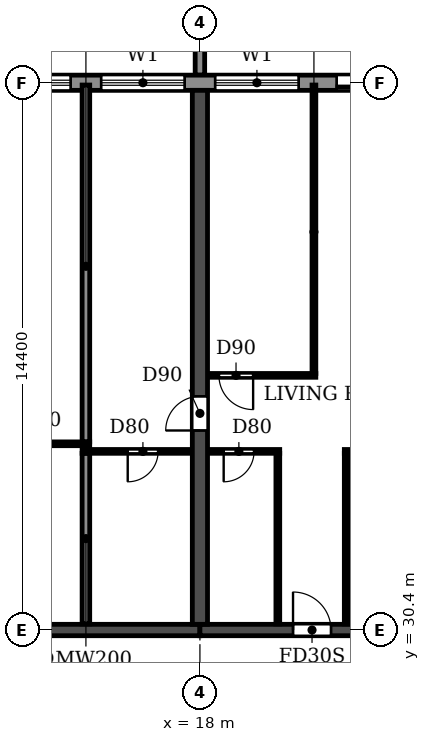
"""IFC4 building model, lengths in metres.
Left out: names, types, materials, properties, quantities, classifications, styles, units other than length and angle.
Written with IfcOpenShell. Run it as: python <this file> out.ifc"""

import sys

from ifc_helpers import new_model, si_unit, direction, frame, frame_2d, origin, place, context, subcontext, project, spatial, polyline, rectangle, outline, extrude, source, transform, mapped, element, fill, save


model = new_model("IFC4")
c1 = context("Model", 3, precision=1e-05, world=origin(), true_north=direction((0.0, 1.0)))
c2 = subcontext(c1, "Body", "Model", "MODEL_VIEW")
j1 = project(units=[si_unit("LENGTHUNIT", "METRE"), si_unit("PLANEANGLEUNIT", "RADIAN")], contexts=[c1])
p1 = place(None, origin())
s1 = spatial("IfcSite", under=j1, at=p1, CompositionType="ELEMENT")
p2 = place(p1, origin())
s2 = spatial("IfcBuilding", under=s1, at=p2, CompositionType="ELEMENT")
p3 = place(p2, frame((0.0, 0.0, 49.8)))
s3 = spatial("IfcBuildingStorey", under=s2, at=p3, CompositionType="ELEMENT", Elevation=49.8)
p4 = place(p3, frame((18.0, 30.55, 0.0), z_axis=(0.0, 0.0, 1.0), x_axis=(0.0, 1.0, 0.0)))
e1 = element("IfcWall", 1, at=p4, inside=s3, PredefinedType="SHEAR", context=c2, shape_type="SweptSolid", body=[
    extrude(rectangle(XDim=14.05, YDim=0.4, at=frame_2d((7.025, 0.0))), origin(), (0.0, 0.0, 1.0), 3.0),
])
p5 = place(p4, frame((5.1, 0.0, 0.0)))
e2 = element("IfcOpeningElement", 2, at=p5, cuts=e1, PredefinedType="OPENING", context=c2, shape_type="SweptSolid", body=[
    extrude(rectangle(XDim=0.9, YDim=2.1, at=frame_2d((0.45, 1.05))), frame((0.0, 0.21, 0.0), z_axis=(0.0, -1.0, 0.0), x_axis=(1.0, 0.0, 0.0)), (0.0, 0.0, 1.0), 0.42),
])
p6 = place(p3, frame((12.0, 30.4, 0.0), z_axis=(0.0, 0.0, 1.0), x_axis=(1.0, 0.0, 0.0)))
e3 = element("IfcWall", 3, at=p6, inside=s3, PredefinedType="SHEAR", context=c2, shape_type="SweptSolid", body=[
    extrude(rectangle(XDim=6.0, YDim=0.3, at=frame_2d((3.0, 0.0))), origin(), (0.0, 0.0, 1.0), 2.4),
])
p7 = place(p3, frame((18.0, 30.4, 0.0), z_axis=(0.0, 0.0, 1.0), x_axis=(1.0, 0.0, 0.0)))
e4 = element("IfcWall", 4, at=p7, inside=s3, PredefinedType="SHEAR", context=c2, shape_type="SweptSolid", body=[
    extrude(rectangle(XDim=6.0, YDim=0.3, at=frame_2d((3.0, 0.0))), origin(), (0.0, 0.0, 1.0), 2.4),
])
p8 = place(p7, frame((2.45, 0.0, 0.0)))
e5 = element("IfcOpeningElement", 5, at=p8, cuts=e4, PredefinedType="OPENING", context=c2, shape_type="SweptSolid", body=[
    extrude(rectangle(XDim=1.0, YDim=2.1, at=frame_2d((0.5, 1.05))), frame((0.0, 0.16, 0.0), z_axis=(0.0, -1.0, 0.0), x_axis=(1.0, 0.0, 0.0)), (0.0, 0.0, 1.0), 0.32),
])
p9 = place(p3, frame((97.317, 44.8, 0.0), z_axis=(0.0, 0.0, 1.0), x_axis=(-1.0, 0.0, 0.0)))
e6 = element("IfcWall", 6, at=p9, inside=s3, PredefinedType="STANDARD", context=c2, shape_type="SweptSolid", body=[
    extrude(rectangle(XDim=92.634, YDim=0.4, at=frame_2d((46.317, 0.0))), origin(), (0.0, 0.0, 1.0), 3.0),
])
p10 = place(p9, frame((88.917, 0.0, 0.0)))
e7 = element("IfcOpeningElement", 7, at=p10, cuts=e6, PredefinedType="OPENING", context=c2, shape_type="SweptSolid", body=[
    extrude(rectangle(XDim=1.8, YDim=2.4, at=frame_2d((0.9, 1.2))), frame((0.0, 0.21, 0.0), z_axis=(0.0, -1.0, 0.0), x_axis=(1.0, 0.0, 0.0)), (0.0, 0.0, 1.0), 0.42),
])
p11 = place(p9, frame((85.717, 0.0, 0.9)))
e8 = element("IfcOpeningElement", 8, at=p11, cuts=e6, PredefinedType="OPENING", context=c2, shape_type="SweptSolid", body=[
    extrude(rectangle(XDim=2.2, YDim=1.5, at=frame_2d((1.1, 0.75))), frame((0.0, 0.21, 0.0), z_axis=(0.0, -1.0, 0.0), x_axis=(1.0, 0.0, 0.0)), (0.0, 0.0, 1.0), 0.42),
])
p12 = place(p9, frame((82.717, 0.0, 0.9)))
e9 = element("IfcOpeningElement", 9, at=p12, cuts=e6, PredefinedType="OPENING", context=c2, shape_type="SweptSolid", body=[
    extrude(rectangle(XDim=2.2, YDim=1.5, at=frame_2d((1.1, 0.75))), frame((0.0, 0.21, 0.0), z_axis=(0.0, -1.0, 0.0), x_axis=(1.0, 0.0, 0.0)), (0.0, 0.0, 1.0), 0.42),
])
p13 = place(p9, frame((79.717, 0.0, 0.9)))
e10 = element("IfcOpeningElement", 10, at=p13, cuts=e6, PredefinedType="OPENING", context=c2, shape_type="SweptSolid", body=[
    extrude(rectangle(XDim=2.2, YDim=1.5, at=frame_2d((1.1, 0.75))), frame((0.0, 0.21, 0.0), z_axis=(0.0, -1.0, 0.0), x_axis=(1.0, 0.0, 0.0)), (0.0, 0.0, 1.0), 0.42),
])
p14 = place(p9, frame((76.717, 0.0, 0.9)))
e11 = element("IfcOpeningElement", 11, at=p14, cuts=e6, PredefinedType="OPENING", context=c2, shape_type="SweptSolid", body=[
    extrude(rectangle(XDim=2.2, YDim=1.5, at=frame_2d((1.1, 0.75))), frame((0.0, 0.21, 0.0), z_axis=(0.0, -1.0, 0.0), x_axis=(1.0, 0.0, 0.0)), (0.0, 0.0, 1.0), 0.42),
])
p15 = place(p9, frame((73.917, 0.0, 0.0)))
e12 = element("IfcOpeningElement", 12, at=p15, cuts=e6, PredefinedType="OPENING", context=c2, shape_type="SweptSolid", body=[
    extrude(rectangle(XDim=1.8, YDim=2.4, at=frame_2d((0.9, 1.2))), frame((0.0, 0.21, 0.0), z_axis=(0.0, -1.0, 0.0), x_axis=(1.0, 0.0, 0.0)), (0.0, 0.0, 1.0), 0.42),
])
p16 = place(p9, frame((70.717, 0.0, 0.9)))
e13 = element("IfcOpeningElement", 13, at=p16, cuts=e6, PredefinedType="OPENING", context=c2, shape_type="SweptSolid", body=[
    extrude(rectangle(XDim=2.2, YDim=1.5, at=frame_2d((1.1, 0.75))), frame((0.0, 0.21, 0.0), z_axis=(0.0, -1.0, 0.0), x_axis=(1.0, 0.0, 0.0)), (0.0, 0.0, 1.0), 0.42),
])
p17 = place(p9, frame((67.717, 0.0, 0.9)))
e14 = element("IfcOpeningElement", 14, at=p17, cuts=e6, PredefinedType="OPENING", context=c2, shape_type="SweptSolid", body=[
    extrude(rectangle(XDim=2.2, YDim=1.5, at=frame_2d((1.1, 0.75))), frame((0.0, 0.21, 0.0), z_axis=(0.0, -1.0, 0.0), x_axis=(1.0, 0.0, 0.0)), (0.0, 0.0, 1.0), 0.42),
])
p18 = place(p9, frame((64.717, 0.0, 0.9)))
e15 = element("IfcOpeningElement", 15, at=p18, cuts=e6, PredefinedType="OPENING", context=c2, shape_type="SweptSolid", body=[
    extrude(rectangle(XDim=2.2, YDim=1.5, at=frame_2d((1.1, 0.75))), frame((0.0, 0.21, 0.0), z_axis=(0.0, -1.0, 0.0), x_axis=(1.0, 0.0, 0.0)), (0.0, 0.0, 1.0), 0.42),
])
p19 = place(p9, frame((61.917, 0.0, 0.0)))
e16 = element("IfcOpeningElement", 16, at=p19, cuts=e6, PredefinedType="OPENING", context=c2, shape_type="SweptSolid", body=[
    extrude(rectangle(XDim=1.8, YDim=2.4, at=frame_2d((0.9, 1.2))), frame((0.0, 0.21, 0.0), z_axis=(0.0, -1.0, 0.0), x_axis=(1.0, 0.0, 0.0)), (0.0, 0.0, 1.0), 0.42),
])
p20 = place(p9, frame((58.717, 0.0, 0.9)))
e17 = element("IfcOpeningElement", 17, at=p20, cuts=e6, PredefinedType="OPENING", context=c2, shape_type="SweptSolid", body=[
    extrude(rectangle(XDim=2.2, YDim=1.5, at=frame_2d((1.1, 0.75))), frame((0.0, 0.21, 0.0), z_axis=(0.0, -1.0, 0.0), x_axis=(1.0, 0.0, 0.0)), (0.0, 0.0, 1.0), 0.42),
])
p21 = place(p9, frame((55.717, 0.0, 0.9)))
e18 = element("IfcOpeningElement", 18, at=p21, cuts=e6, PredefinedType="OPENING", context=c2, shape_type="SweptSolid", body=[
    extrude(rectangle(XDim=2.2, YDim=1.5, at=frame_2d((1.1, 0.75))), frame((0.0, 0.21, 0.0), z_axis=(0.0, -1.0, 0.0), x_axis=(1.0, 0.0, 0.0)), (0.0, 0.0, 1.0), 0.42),
])
p22 = place(p9, frame((52.717, 0.0, 0.9)))
e19 = element("IfcOpeningElement", 19, at=p22, cuts=e6, PredefinedType="OPENING", context=c2, shape_type="SweptSolid", body=[
    extrude(rectangle(XDim=2.2, YDim=1.5, at=frame_2d((1.1, 0.75))), frame((0.0, 0.21, 0.0), z_axis=(0.0, -1.0, 0.0), x_axis=(1.0, 0.0, 0.0)), (0.0, 0.0, 1.0), 0.42),
])
p23 = place(p9, frame((49.917, 0.0, 0.0)))
e20 = element("IfcOpeningElement", 20, at=p23, cuts=e6, PredefinedType="OPENING", context=c2, shape_type="SweptSolid", body=[
    extrude(rectangle(XDim=1.8, YDim=2.4, at=frame_2d((0.9, 1.2))), frame((0.0, 0.21, 0.0), z_axis=(0.0, -1.0, 0.0), x_axis=(1.0, 0.0, 0.0)), (0.0, 0.0, 1.0), 0.42),
])
p24 = place(p9, frame((46.717, 0.0, 0.9)))
e21 = element("IfcOpeningElement", 21, at=p24, cuts=e6, PredefinedType="OPENING", context=c2, shape_type="SweptSolid", body=[
    extrude(rectangle(XDim=2.2, YDim=1.5, at=frame_2d((1.1, 0.75))), frame((0.0, 0.21, 0.0), z_axis=(0.0, -1.0, 0.0), x_axis=(1.0, 0.0, 0.0)), (0.0, 0.0, 1.0), 0.42),
])
p25 = place(p9, frame((43.717, 0.0, 0.9)))
e22 = element("IfcOpeningElement", 22, at=p25, cuts=e6, PredefinedType="OPENING", context=c2, shape_type="SweptSolid", body=[
    extrude(rectangle(XDim=2.2, YDim=1.5, at=frame_2d((1.1, 0.75))), frame((0.0, 0.21, 0.0), z_axis=(0.0, -1.0, 0.0), x_axis=(1.0, 0.0, 0.0)), (0.0, 0.0, 1.0), 0.42),
])
p26 = place(p9, frame((40.717, 0.0, 0.9)))
e23 = element("IfcOpeningElement", 23, at=p26, cuts=e6, PredefinedType="OPENING", context=c2, shape_type="SweptSolid", body=[
    extrude(rectangle(XDim=2.2, YDim=1.5, at=frame_2d((1.1, 0.75))), frame((0.0, 0.21, 0.0), z_axis=(0.0, -1.0, 0.0), x_axis=(1.0, 0.0, 0.0)), (0.0, 0.0, 1.0), 0.42),
])
p27 = place(p9, frame((37.917, 0.0, 0.0)))
e24 = element("IfcOpeningElement", 24, at=p27, cuts=e6, PredefinedType="OPENING", context=c2, shape_type="SweptSolid", body=[
    extrude(rectangle(XDim=1.8, YDim=2.4, at=frame_2d((0.9, 1.2))), frame((0.0, 0.21, 0.0), z_axis=(0.0, -1.0, 0.0), x_axis=(1.0, 0.0, 0.0)), (0.0, 0.0, 1.0), 0.42),
])
p28 = place(p9, frame((34.717, 0.0, 0.9)))
e25 = element("IfcOpeningElement", 25, at=p28, cuts=e6, PredefinedType="OPENING", context=c2, shape_type="SweptSolid", body=[
    extrude(rectangle(XDim=2.2, YDim=1.5, at=frame_2d((1.1, 0.75))), frame((0.0, 0.21, 0.0), z_axis=(0.0, -1.0, 0.0), x_axis=(1.0, 0.0, 0.0)), (0.0, 0.0, 1.0), 0.42),
])
p29 = place(p9, frame((31.717, 0.0, 0.9)))
e26 = element("IfcOpeningElement", 26, at=p29, cuts=e6, PredefinedType="OPENING", context=c2, shape_type="SweptSolid", body=[
    extrude(rectangle(XDim=2.2, YDim=1.5, at=frame_2d((1.1, 0.75))), frame((0.0, 0.21, 0.0), z_axis=(0.0, -1.0, 0.0), x_axis=(1.0, 0.0, 0.0)), (0.0, 0.0, 1.0), 0.42),
])
p30 = place(p9, frame((28.717, 0.0, 0.9)))
e27 = element("IfcOpeningElement", 27, at=p30, cuts=e6, PredefinedType="OPENING", context=c2, shape_type="SweptSolid", body=[
    extrude(rectangle(XDim=2.2, YDim=1.5, at=frame_2d((1.1, 0.75))), frame((0.0, 0.21, 0.0), z_axis=(0.0, -1.0, 0.0), x_axis=(1.0, 0.0, 0.0)), (0.0, 0.0, 1.0), 0.42),
])
p31 = place(p9, frame((25.917, 0.0, 0.0)))
e28 = element("IfcOpeningElement", 28, at=p31, cuts=e6, PredefinedType="OPENING", context=c2, shape_type="SweptSolid", body=[
    extrude(rectangle(XDim=1.8, YDim=2.4, at=frame_2d((0.9, 1.2))), frame((0.0, 0.21, 0.0), z_axis=(0.0, -1.0, 0.0), x_axis=(1.0, 0.0, 0.0)), (0.0, 0.0, 1.0), 0.42),
])
p32 = place(p9, frame((22.917, 0.0, 0.0)))
e29 = element("IfcOpeningElement", 29, at=p32, cuts=e6, PredefinedType="OPENING", context=c2, shape_type="SweptSolid", body=[
    extrude(rectangle(XDim=1.8, YDim=2.4, at=frame_2d((0.9, 1.2))), frame((0.0, 0.21, 0.0), z_axis=(0.0, -1.0, 0.0), x_axis=(1.0, 0.0, 0.0)), (0.0, 0.0, 1.0), 0.42),
])
p33 = place(p9, frame((19.717, 0.0, 0.9)))
e30 = element("IfcOpeningElement", 30, at=p33, cuts=e6, PredefinedType="OPENING", context=c2, shape_type="SweptSolid", body=[
    extrude(rectangle(XDim=2.2, YDim=1.5, at=frame_2d((1.1, 0.75))), frame((0.0, 0.21, 0.0), z_axis=(0.0, -1.0, 0.0), x_axis=(1.0, 0.0, 0.0)), (0.0, 0.0, 1.0), 0.42),
])
p34 = place(p9, frame((16.717, 0.0, 0.9)))
e31 = element("IfcOpeningElement", 31, at=p34, cuts=e6, PredefinedType="OPENING", context=c2, shape_type="SweptSolid", body=[
    extrude(rectangle(XDim=2.2, YDim=1.5, at=frame_2d((1.1, 0.75))), frame((0.0, 0.21, 0.0), z_axis=(0.0, -1.0, 0.0), x_axis=(1.0, 0.0, 0.0)), (0.0, 0.0, 1.0), 0.42),
])
p35 = place(p9, frame((13.717, 0.0, 0.9)))
e32 = element("IfcOpeningElement", 32, at=p35, cuts=e6, PredefinedType="OPENING", context=c2, shape_type="SweptSolid", body=[
    extrude(rectangle(XDim=2.2, YDim=1.5, at=frame_2d((1.1, 0.75))), frame((0.0, 0.21, 0.0), z_axis=(0.0, -1.0, 0.0), x_axis=(1.0, 0.0, 0.0)), (0.0, 0.0, 1.0), 0.42),
])
p36 = place(p9, frame((10.717, 0.0, 0.9)))
e33 = element("IfcOpeningElement", 33, at=p36, cuts=e6, PredefinedType="OPENING", context=c2, shape_type="SweptSolid", body=[
    extrude(rectangle(XDim=2.2, YDim=1.5, at=frame_2d((1.1, 0.75))), frame((0.0, 0.21, 0.0), z_axis=(0.0, -1.0, 0.0), x_axis=(1.0, 0.0, 0.0)), (0.0, 0.0, 1.0), 0.42),
])
p37 = place(p9, frame((7.917, 0.0, 0.0)))
e34 = element("IfcOpeningElement", 34, at=p37, cuts=e6, PredefinedType="OPENING", context=c2, shape_type="SweptSolid", body=[
    extrude(rectangle(XDim=1.8, YDim=2.4, at=frame_2d((0.9, 1.2))), frame((0.0, 0.21, 0.0), z_axis=(0.0, -1.0, 0.0), x_axis=(1.0, 0.0, 0.0)), (0.0, 0.0, 1.0), 0.42),
])
p38 = place(p9, frame((4.717, 0.0, 0.9)))
e35 = element("IfcOpeningElement", 35, at=p38, cuts=e6, PredefinedType="OPENING", context=c2, shape_type="SweptSolid", body=[
    extrude(rectangle(XDim=2.2, YDim=1.5, at=frame_2d((1.1, 0.75))), frame((0.0, 0.21, 0.0), z_axis=(0.0, -1.0, 0.0), x_axis=(1.0, 0.0, 0.0)), (0.0, 0.0, 1.0), 0.42),
])
p39 = place(p9, frame((1.917, 0.0, 0.0)))
e36 = element("IfcOpeningElement", 36, at=p39, cuts=e6, PredefinedType="OPENING", context=c2, shape_type="SweptSolid", body=[
    extrude(rectangle(XDim=1.8, YDim=2.4, at=frame_2d((0.9, 1.2))), frame((0.0, 0.21, 0.0), z_axis=(0.0, -1.0, 0.0), x_axis=(1.0, 0.0, 0.0)), (0.0, 0.0, 1.0), 0.42),
])
m1 = source(origin(), c2, "Body", "SweptSolid", [
    extrude(outline(polyline([(0.0, 0.0), (0.25, 0.0), (0.25, 3.1), (0.0, 3.1), (0.0, 0.0)])), origin(), (0.0, 0.0, 1.0), 3.1),
])
p40 = place(p3, frame((17.875, 45.0, 0.0)))
e37 = element("IfcWall", 37, at=p40, inside=s3, PredefinedType="STANDARD", context=c2, shape_type="MappedRepresentation", body=[
    mapped(m1, transform((0.0, 0.0, 0.0))),
])
p41 = place(p3, frame((15.0, 30.56, 0.0), z_axis=(0.0, 0.0, 1.0), x_axis=(0.0, 1.0, 0.0)))
e38 = element("IfcWall", 38, at=p41, inside=s3, PredefinedType="PARTITIONING", context=c2, shape_type="SweptSolid", body=[
    extrude(rectangle(XDim=4.49, YDim=0.2, at=frame_2d((2.245, 0.0))), origin(), (0.0, 0.0, 1.0), 3.0),
])
p42 = place(p3, frame((15.0, 35.35, 0.0), z_axis=(0.0, 0.0, 1.0), x_axis=(0.0, 1.0, 0.0)))
e39 = element("IfcWall", 39, at=p42, inside=s3, PredefinedType="PARTITIONING", context=c2, shape_type="SweptSolid", body=[
    extrude(rectangle(XDim=9.39, YDim=0.2, at=frame_2d((4.695, 0.0))), origin(), (0.0, 0.0, 1.0), 3.0),
])
p43 = place(p3, frame((14.9, 35.1, 0.0), z_axis=(0.0, 0.0, 1.0), x_axis=(1.0, 0.0, 0.0)))
e40 = element("IfcWall", 40, at=p43, inside=s3, PredefinedType="PARTITIONING", context=c2, shape_type="SweptSolid", body=[
    extrude(rectangle(XDim=2.89, YDim=0.1, at=frame_2d((1.445, 0.0))), origin(), (0.0, 0.0, 1.0), 3.0),
])
p44 = place(p43, frame((1.2, 0.0, 0.0)))
e41 = element("IfcOpeningElement", 41, at=p44, cuts=e40, PredefinedType="OPENING", context=c2, shape_type="SweptSolid", body=[
    extrude(rectangle(XDim=0.8, YDim=2.1, at=frame_2d((0.4, 1.05))), frame((0.0, 0.06, 0.0), z_axis=(0.0, -1.0, 0.0), x_axis=(1.0, 0.0, 0.0)), (0.0, 0.0, 1.0), 0.12),
])
p45 = place(p3, frame((18.21, 35.1, 0.0), z_axis=(0.0, 0.0, 1.0), x_axis=(1.0, 0.0, 0.0)))
e42 = element("IfcWall", 42, at=p45, inside=s3, PredefinedType="PARTITIONING", context=c2, shape_type="SweptSolid", body=[
    extrude(rectangle(XDim=1.89, YDim=0.1, at=frame_2d((0.945, 0.0))), origin(), (0.0, 0.0, 1.0), 3.0),
])
p46 = place(p45, frame((0.415, 0.0, 0.0)))
e43 = element("IfcOpeningElement", 43, at=p46, cuts=e42, PredefinedType="OPENING", context=c2, shape_type="SweptSolid", body=[
    extrude(rectangle(XDim=0.8, YDim=2.1, at=frame_2d((0.4, 1.05))), frame((0.0, 0.06, 0.0), z_axis=(0.0, -1.0, 0.0), x_axis=(1.0, 0.0, 0.0)), (0.0, 0.0, 1.0), 0.12),
])
p47 = place(p3, frame((21.8, 35.1, 0.0), z_axis=(0.0, 0.0, 1.0), x_axis=(1.0, 0.0, 0.0)))
e44 = element("IfcWall", 44, at=p47, inside=s3, PredefinedType="PARTITIONING", context=c2, shape_type="SweptSolid", body=[
    extrude(rectangle(XDim=1.99, YDim=0.1, at=frame_2d((0.995, 0.0))), origin(), (0.0, 0.0, 1.0), 3.0),
])
p48 = place(p47, frame((0.675, 0.0, 0.0)))
e45 = element("IfcOpeningElement", 45, at=p48, cuts=e44, PredefinedType="OPENING", context=c2, shape_type="SweptSolid", body=[
    extrude(rectangle(XDim=0.9, YDim=2.1, at=frame_2d((0.45, 1.05))), frame((0.0, 0.06, 0.0), z_axis=(0.0, -1.0, 0.0), x_axis=(1.0, 0.0, 0.0)), (0.0, 0.0, 1.0), 0.12),
])
p49 = place(p3, frame((12.21, 35.3, 0.0), z_axis=(0.0, 0.0, 1.0), x_axis=(1.0, 0.0, 0.0)))
e46 = element("IfcWall", 46, at=p49, inside=s3, PredefinedType="PARTITIONING", context=c2, shape_type="SweptSolid", body=[
    extrude(rectangle(XDim=2.89, YDim=0.1, at=frame_2d((1.445, 0.0))), origin(), (0.0, 0.0, 1.0), 3.0),
])
p50 = place(p49, frame((0.89, 0.0, 0.0)))
e47 = element("IfcOpeningElement", 47, at=p50, cuts=e46, PredefinedType="OPENING", context=c2, shape_type="SweptSolid", body=[
    extrude(rectangle(XDim=0.8, YDim=2.1, at=frame_2d((0.4, 1.05))), frame((0.0, 0.06, 0.0), z_axis=(0.0, -1.0, 0.0), x_axis=(1.0, 0.0, 0.0)), (0.0, 0.0, 1.0), 0.12),
])
p51 = place(p3, frame((18.21, 37.1, 0.0), z_axis=(0.0, 0.0, 1.0), x_axis=(1.0, 0.0, 0.0)))
e48 = element("IfcWall", 48, at=p51, inside=s3, PredefinedType="PARTITIONING", context=c2, shape_type="SweptSolid", body=[
    extrude(rectangle(XDim=2.84, YDim=0.1, at=frame_2d((1.42, 0.0))), origin(), (0.0, 0.0, 1.0), 3.0),
])
p52 = place(p51, frame((0.29, 0.0, 0.0)))
e49 = element("IfcOpeningElement", 49, at=p52, cuts=e48, PredefinedType="OPENING", context=c2, shape_type="SweptSolid", body=[
    extrude(rectangle(XDim=0.9, YDim=2.1, at=frame_2d((0.45, 1.05))), frame((0.0, 0.06, 0.0), z_axis=(0.0, -1.0, 0.0), x_axis=(1.0, 0.0, 0.0)), (0.0, 0.0, 1.0), 0.12),
])
p53 = place(p3, frame((20.05, 30.56, 0.0), z_axis=(0.0, 0.0, 1.0), x_axis=(0.0, 1.0, 0.0)))
e50 = element("IfcWall", 50, at=p53, inside=s3, PredefinedType="PARTITIONING", context=c2, shape_type="SweptSolid", body=[
    extrude(rectangle(XDim=4.49, YDim=0.1, at=frame_2d((2.245, 0.0))), origin(), (0.0, 0.0, 1.0), 3.0),
])
p54 = place(p3, frame((21.0, 37.15, 0.0), z_axis=(0.0, 0.0, 1.0), x_axis=(0.0, 1.0, 0.0)))
e51 = element("IfcWall", 51, at=p54, inside=s3, PredefinedType="PARTITIONING", context=c2, shape_type="SweptSolid", body=[
    extrude(rectangle(XDim=7.59, YDim=0.1, at=frame_2d((3.795, 0.0))), origin(), (0.0, 0.0, 1.0), 3.0),
])
p55 = place(p3, frame((21.85, 30.56, 0.0), z_axis=(0.0, 0.0, 1.0), x_axis=(0.0, 1.0, 0.0)))
e52 = element("IfcWall", 52, at=p55, inside=s3, PredefinedType="PARTITIONING", context=c2, shape_type="SweptSolid", body=[
    extrude(rectangle(XDim=4.49, YDim=0.1, at=frame_2d((2.245, 0.0))), origin(), (0.0, 0.0, 1.0), 3.0),
])
p56 = place(p12, origin())
e53 = element("IfcWindow", 53, at=p56, inside=s3, PartitioningType="DOUBLE_PANEL_HORIZONTAL", PredefinedType="WINDOW", context=c2, shape_type="SweptSolid", body=[
    extrude(rectangle(XDim=2.2, YDim=1.5, at=frame_2d((1.1, 0.75))), frame((0.0, 0.03, 0.0), z_axis=(0.0, -1.0, 0.0), x_axis=(1.0, 0.0, 0.0)), (0.0, 0.0, 1.0), 0.06),
])
fill(e9, e53)
p57 = place(p13, origin())
e54 = element("IfcWindow", 54, at=p57, inside=s3, PartitioningType="DOUBLE_PANEL_HORIZONTAL", PredefinedType="WINDOW", context=c2, shape_type="SweptSolid", body=[
    extrude(rectangle(XDim=2.2, YDim=1.5, at=frame_2d((1.1, 0.75))), frame((0.0, 0.03, 0.0), z_axis=(0.0, -1.0, 0.0), x_axis=(1.0, 0.0, 0.0)), (0.0, 0.0, 1.0), 0.06),
])
fill(e10, e54)
p58 = place(p14, origin())
e55 = element("IfcWindow", 55, at=p58, inside=s3, PartitioningType="DOUBLE_PANEL_HORIZONTAL", PredefinedType="WINDOW", context=c2, shape_type="SweptSolid", body=[
    extrude(rectangle(XDim=2.2, YDim=1.5, at=frame_2d((1.1, 0.75))), frame((0.0, 0.03, 0.0), z_axis=(0.0, -1.0, 0.0), x_axis=(1.0, 0.0, 0.0)), (0.0, 0.0, 1.0), 0.06),
])
fill(e11, e55)
p59 = place(p15, origin())
e56 = element("IfcDoor", 56, at=p59, inside=s3, OperationType="DOUBLE_DOOR_SLIDING", PredefinedType="DOOR", context=c2, shape_type="SweptSolid", body=[
    extrude(rectangle(XDim=1.8, YDim=2.4, at=frame_2d((0.9, 1.2))), frame((0.0, 0.025, 0.0), z_axis=(0.0, -1.0, 0.0), x_axis=(1.0, 0.0, 0.0)), (0.0, 0.0, 1.0), 0.05),
])
fill(e12, e56)
p60 = place(p44, frame((0.8, 0.0, 0.0), z_axis=(0.0, 0.0, 1.0), x_axis=(-1.0, 0.0, 0.0)))
e57 = element("IfcDoor", 57, at=p60, inside=s3, OperationType="SINGLE_SWING_RIGHT", PredefinedType="DOOR", context=c2, shape_type="SweptSolid", body=[
    extrude(rectangle(XDim=0.8, YDim=2.1, at=frame_2d((0.4, 1.05))), frame((0.0, 0.025, 0.0), z_axis=(0.0, -1.0, 0.0), x_axis=(1.0, 0.0, 0.0)), (0.0, 0.0, 1.0), 0.05),
])
fill(e41, e57)
p61 = place(p5, origin())
e58 = element("IfcDoor", 58, at=p61, inside=s3, OperationType="SINGLE_SWING_LEFT", PredefinedType="DOOR", context=c2, shape_type="SweptSolid", body=[
    extrude(rectangle(XDim=0.9, YDim=2.1, at=frame_2d((0.45, 1.05))), frame((0.0, 0.025, 0.0), z_axis=(0.0, -1.0, 0.0), x_axis=(1.0, 0.0, 0.0)), (0.0, 0.0, 1.0), 0.05),
])
fill(e2, e58)
p62 = place(p52, frame((0.9, 0.0, 0.0), z_axis=(0.0, 0.0, 1.0), x_axis=(-1.0, 0.0, 0.0)))
e59 = element("IfcDoor", 59, at=p62, inside=s3, OperationType="SINGLE_SWING_LEFT", PredefinedType="DOOR", context=c2, shape_type="SweptSolid", body=[
    extrude(rectangle(XDim=0.9, YDim=2.1, at=frame_2d((0.45, 1.05))), frame((0.0, 0.025, 0.0), z_axis=(0.0, -1.0, 0.0), x_axis=(1.0, 0.0, 0.0)), (0.0, 0.0, 1.0), 0.05),
])
fill(e49, e59)
p63 = place(p46, frame((0.8, 0.0, 0.0), z_axis=(0.0, 0.0, 1.0), x_axis=(-1.0, 0.0, 0.0)))
e60 = element("IfcDoor", 60, at=p63, inside=s3, OperationType="SINGLE_SWING_RIGHT", PredefinedType="DOOR", context=c2, shape_type="SweptSolid", body=[
    extrude(rectangle(XDim=0.8, YDim=2.1, at=frame_2d((0.4, 1.05))), frame((0.0, 0.025, 0.0), z_axis=(0.0, -1.0, 0.0), x_axis=(1.0, 0.0, 0.0)), (0.0, 0.0, 1.0), 0.05),
])
fill(e43, e60)
p64 = place(p8, origin())
e61 = element("IfcDoor", 61, at=p64, inside=s3, OperationType="SINGLE_SWING_LEFT", PredefinedType="DOOR", context=c2, shape_type="SweptSolid", body=[
    extrude(rectangle(XDim=1.0, YDim=2.1, at=frame_2d((0.5, 1.05))), frame((0.0, 0.025, 0.0), z_axis=(0.0, -1.0, 0.0), x_axis=(1.0, 0.0, 0.0)), (0.0, 0.0, 1.0), 0.05),
])
fill(e5, e61)
save(model, sys.argv[1])
